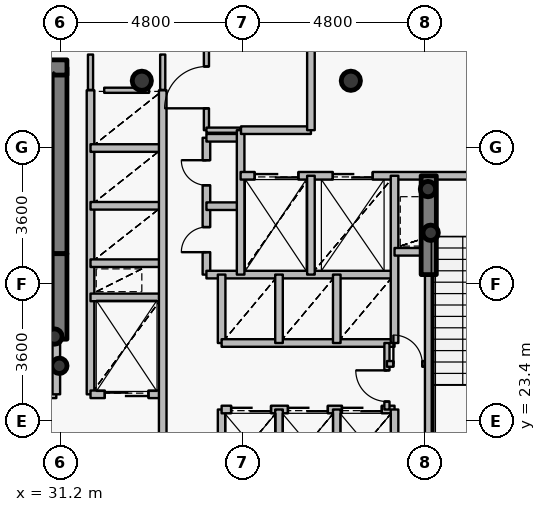
"""IFC4 building model, lengths in metres.
Left out: names, types, materials, properties, quantities, classifications, styles, units other than length and angle.
Written with IfcOpenShell. Run it as: python <this file> out.ifc"""

import sys

from ifc_helpers import new_model, si_unit, direction, frame, frame_2d, origin, origin_2d, place, context, subcontext, project, spatial, rectangle, hollow_circle, extrude, source, transform, mapped, element, fill, save


model = new_model("IFC4")
c1 = context("Model", 3, precision=1e-05, world=origin(), true_north=direction((0.0, 1.0)))
c2 = subcontext(c1, "Body", "Model", "MODEL_VIEW")
j1 = project(units=[si_unit("LENGTHUNIT", "METRE"), si_unit("PLANEANGLEUNIT", "RADIAN")], contexts=[c1])
p1 = place(None, origin())
s1 = spatial("IfcSite", under=j1, at=p1, CompositionType="ELEMENT")
p2 = place(p1, origin())
s2 = spatial("IfcBuilding", under=s1, at=p2, CompositionType="ELEMENT")
p3 = place(p2, frame((0.0, 0.0, 82.8)))
s3 = spatial("IfcBuildingStorey", under=s2, at=p3, CompositionType="ELEMENT", Elevation=82.8)
for number, where, z_axis, x_axis in (
    (1, (38.85, 32.35, 0.0), (0.0, 0.0, 1.0), (1.0, 0.0, 0.0)),
    (2, (33.35, 32.35, 0.0), (0.0, 0.0, 1.0), (1.0, 0.0, 0.0)),
):
    element("IfcColumn", number, at=place(p3, frame(where, z_axis=z_axis, x_axis=x_axis)), inside=s3, PredefinedType="COLUMN", context=c2, shape_type="SweptSolid", body=[
        extrude(hollow_circle(Radius=0.254, WallThickness=0.02, at=origin_2d()), origin(), (0.0, 0.0, 1.0), 4.2),
    ])
p4 = place(p3, frame((31.18, 27.8, 0.0), z_axis=(0.0, 0.0, 1.0), x_axis=(0.0, 1.0, 0.0)))
e3 = element("IfcWall", 3, at=p4, inside=s3, PredefinedType="SHEAR", context=c2, shape_type="SweptSolid", body=[
    extrude(rectangle(XDim=4.9, YDim=0.4, at=frame_2d((2.45, 0.0))), origin(), (0.0, 0.0, 1.0), 4.2),
])
p5 = place(p3, frame((27.28, 32.7, 0.0), z_axis=(0.0, 0.0, 1.0), x_axis=(1.0, 0.0, 0.0)))
e4 = element("IfcWall", 4, at=p5, inside=s3, PredefinedType="SHEAR", context=c2, shape_type="SweptSolid", body=[
    extrude(rectangle(XDim=4.1, YDim=0.4, at=frame_2d((2.05, 0.0))), origin(), (0.0, 0.0, 1.0), 4.2),
])
for number, where, z_axis, x_axis in (
    (5, (31.05, 25.62, 0.0), (0.0, 0.0, 1.0), (1.0, 0.0, 0.0)),
    (6, (31.18, 24.85, 0.0), (0.0, 0.0, 1.0), (1.0, 0.0, 0.0)),
    (7, (40.95, 28.35, 0.0), (0.0, 0.0, 1.0), (1.0, 0.0, 0.0)),
    (8, (40.88, 29.5, 0.0), (0.0, 0.0, 1.0), (1.0, 0.0, 0.0)),
):
    element("IfcColumn", number, at=place(p3, frame(where, z_axis=z_axis, x_axis=x_axis)), inside=s3, PredefinedType="COLUMN", context=c2, shape_type="SweptSolid", body=[
        extrude(hollow_circle(Radius=0.203, WallThickness=0.016, at=origin_2d()), origin(), (0.0, 0.0, 1.0), 4.2),
    ])
p6 = place(p3, frame((31.18, 25.55, 0.0), z_axis=(0.0, 0.0, 1.0), x_axis=(0.0, 1.0, 0.0)))
e9 = element("IfcWall", 9, at=p6, inside=s3, PredefinedType="SHEAR", context=c2, shape_type="SweptSolid", body=[
    extrude(rectangle(XDim=2.25, YDim=0.4, at=frame_2d((1.125, 0.0))), origin(), (0.0, 0.0, 1.0), 3.5),
])
p7 = place(p3, frame((40.9, 27.25, 0.0), z_axis=(0.0, 0.0, 1.0), x_axis=(0.0, 1.0, 0.0)))
e10 = element("IfcWall", 10, at=p7, inside=s3, PredefinedType="SHEAR", context=c2, shape_type="SweptSolid", body=[
    extrude(rectangle(XDim=2.6, YDim=0.4, at=frame_2d((1.3, 0.0))), origin(), (0.0, 0.0, 1.0), 3.5),
])
p8 = place(p3, frame((27.56, 24.1, 0.0), z_axis=(0.0, 0.0, 1.0), x_axis=(1.0, 0.0, 0.0)))
e11 = element("IfcWall", 11, at=p8, inside=s3, PredefinedType="PARTITIONING", context=c2, shape_type="SweptSolid", body=[
    extrude(rectangle(XDim=3.54, YDim=0.2, at=frame_2d((1.77, 0.0))), origin(), (0.0, 0.0, 1.0), 3.9),
])
p9 = place(p8, frame((1.17, 0.0, 0.0)))
e12 = element("IfcOpeningElement", 12, at=p9, cuts=e11, PredefinedType="OPENING", context=c2, shape_type="SweptSolid", body=[
    extrude(rectangle(XDim=1.2, YDim=2.15, at=origin_2d()), frame((0.6, 0.11, 1.075), z_axis=(0.0, -1.0, 0.0), x_axis=(1.0, 0.0, 0.0)), (0.0, 0.0, 1.0), 0.22),
])
p10 = place(p3, frame((31.1, 24.1, 0.0), z_axis=(0.0, 0.0, 1.0), x_axis=(0.0, 1.0, 0.0)))
e13 = element("IfcWall", 13, at=p10, inside=s3, PredefinedType="PARTITIONING", context=c2, shape_type="SweptSolid", body=[
    extrude(rectangle(XDim=1.44, YDim=0.2, at=frame_2d((0.72, 0.0))), origin(), (0.0, 0.0, 1.0), 3.9),
])
p11 = place(p3, frame((32.0, 24.1, 0.0), z_axis=(0.0, 0.0, 1.0), x_axis=(0.0, 1.0, 0.0)))
e14 = element("IfcWall", 14, at=p11, inside=s3, PredefinedType="PARTITIONING", context=c2, shape_type="SweptSolid", body=[
    extrude(rectangle(XDim=8.0, YDim=0.2, at=frame_2d((4.0, 0.0))), origin(), (0.0, 0.0, 1.0), 3.9),
])
p12 = place(p3, frame((32.0, 24.1, 0.0), z_axis=(0.0, 0.0, 1.0), x_axis=(1.0, 0.0, 0.0)))
e15 = element("IfcWall", 15, at=p12, inside=s3, PredefinedType="PARTITIONING", context=c2, shape_type="SweptSolid", body=[
    extrude(rectangle(XDim=1.9, YDim=0.2, at=frame_2d((0.95, 0.0))), origin(), (0.0, 0.0, 1.0), 3.485),
])
p13 = place(p12, frame((0.375, 0.0, 0.0)))
e16 = element("IfcOpeningElement", 16, at=p13, cuts=e15, PredefinedType="OPENING", context=c2, shape_type="SweptSolid", body=[
    extrude(rectangle(XDim=1.15, YDim=2.15, at=origin_2d()), frame((0.575, 0.11, 1.075), z_axis=(0.0, -1.0, 0.0), x_axis=(1.0, 0.0, 0.0)), (0.0, 0.0, 1.0), 0.22),
])
for number, where, z_axis, x_axis in (
    (17, (32.0, 26.65, 0.0), (0.0, 0.0, 1.0), (1.0, 0.0, 0.0)),
    (18, (32.0, 27.55, 0.0), (0.0, 0.0, 1.0), (1.0, 0.0, 0.0)),
    (19, (32.0, 29.06, 0.0), (0.0, 0.0, 1.0), (1.0, 0.0, 0.0)),
    (20, (32.0, 30.58, 0.0), (0.0, 0.0, 1.0), (1.0, 0.0, 0.0)),
):
    element("IfcWall", number, at=place(p3, frame(where, z_axis=z_axis, x_axis=x_axis)), inside=s3, PredefinedType="PARTITIONING", context=c2, shape_type="SweptSolid", body=[
        extrude(rectangle(XDim=1.9, YDim=0.2, at=frame_2d((0.95, 0.0))), origin(), (0.0, 0.0, 1.0), 3.485),
    ])
p14 = place(p3, frame((33.9, 20.7, 0.0), z_axis=(0.0, 0.0, 1.0), x_axis=(0.0, 1.0, 0.0)))
e21 = element("IfcWall", 21, at=p14, inside=s3, PredefinedType="PARTITIONING", context=c2, shape_type="SweptSolid", body=[
    extrude(rectangle(XDim=11.4, YDim=0.2, at=frame_2d((5.7, 0.0))), origin(), (0.0, 0.0, 1.0), 3.485),
])
p15 = place(p3, frame((35.05, 27.25, 0.0), z_axis=(0.0, 0.0, 1.0), x_axis=(0.0, 1.0, 0.0)))
e22 = element("IfcWall", 22, at=p15, inside=s3, PredefinedType="PARTITIONING", context=c2, shape_type="SweptSolid", body=[
    extrude(rectangle(XDim=3.6, YDim=0.2, at=frame_2d((1.8, 0.0))), origin(), (0.0, 0.0, 1.0), 3.9),
])
p16 = place(p15, frame((0.59, 0.0, 0.0)))
e23 = element("IfcOpeningElement", 23, at=p16, cuts=e22, PredefinedType="OPENING", context=c2, shape_type="SweptSolid", body=[
    extrude(rectangle(XDim=0.66, YDim=2.05, at=origin_2d()), frame((0.33, 0.11, 1.025), z_axis=(0.0, -1.0, 0.0), x_axis=(1.0, 0.0, 0.0)), (0.0, 0.0, 1.0), 0.22),
])
p17 = place(p15, frame((2.35, 0.0, 0.0)))
e24 = element("IfcOpeningElement", 24, at=p17, cuts=e22, PredefinedType="OPENING", context=c2, shape_type="SweptSolid", body=[
    extrude(rectangle(XDim=0.66, YDim=2.05, at=origin_2d()), frame((0.33, 0.11, 1.025), z_axis=(0.0, -1.0, 0.0), x_axis=(1.0, 0.0, 0.0)), (0.0, 0.0, 1.0), 0.22),
])
p18 = place(p3, frame((35.05, 27.25, 0.0), z_axis=(0.0, 0.0, 1.0), x_axis=(1.0, 0.0, 0.0)))
e25 = element("IfcWall", 25, at=p18, inside=s3, PredefinedType="PARTITIONING", context=c2, shape_type="SweptSolid", body=[
    extrude(rectangle(XDim=4.95, YDim=0.2, at=frame_2d((2.475, 0.0))), origin(), (0.0, 0.0, 1.0), 3.485),
])
for number, where, z_axis, x_axis in (
    (26, (35.05, 29.05, 0.0), (0.0, 0.0, 1.0), (1.0, 0.0, 0.0)),
    (27, (35.05, 30.85, 0.0), (0.0, 0.0, 1.0), (1.0, 0.0, 0.0)),
):
    element("IfcWall", number, at=place(p3, frame(where, z_axis=z_axis, x_axis=x_axis)), inside=s3, PredefinedType="PARTITIONING", context=c2, shape_type="SweptSolid", body=[
        extrude(rectangle(XDim=0.9, YDim=0.2, at=frame_2d((0.45, 0.0))), origin(), (0.0, 0.0, 1.0), 3.9),
    ])
p19 = place(p3, frame((35.05, 31.05, 0.0), z_axis=(0.0, 0.0, 1.0), x_axis=(0.0, 1.0, 0.0)))
e28 = element("IfcWall", 28, at=p19, inside=s3, PredefinedType="PARTITIONING", context=c2, shape_type="SweptSolid", body=[
    extrude(rectangle(XDim=2.25, YDim=0.135, at=frame_2d((1.125, 0.0))), origin(), (0.0, 0.0, 1.0), 3.485),
])
p20 = place(p19, frame((0.575, 0.0, 0.0)))
e29 = element("IfcOpeningElement", 29, at=p20, cuts=e28, PredefinedType="OPENING", context=c2, shape_type="SweptSolid", body=[
    extrude(rectangle(XDim=1.1, YDim=2.15, at=origin_2d()), frame((0.55, 0.078, 1.075), z_axis=(0.0, -1.0, 0.0), x_axis=(1.0, 0.0, 0.0)), (0.0, 0.0, 1.0), 0.155),
])
p21 = place(p3, frame((35.05, 31.05, 0.0), z_axis=(0.0, 0.0, 1.0), x_axis=(1.0, 0.0, 0.0)))
e30 = element("IfcWall", 30, at=p21, inside=s3, PredefinedType="PARTITIONING", context=c2, shape_type="SweptSolid", body=[
    extrude(rectangle(XDim=0.9, YDim=0.135, at=frame_2d((0.45, 0.0))), origin(), (0.0, 0.0, 1.0), 3.9),
])
p22 = place(p3, frame((35.45, 21.9, 0.0), z_axis=(0.0, 0.0, 1.0), x_axis=(0.0, 1.0, 0.0)))
e31 = element("IfcWall", 31, at=p22, inside=s3, PredefinedType="PARTITIONING", context=c2, shape_type="SweptSolid", body=[
    extrude(rectangle(XDim=1.8, YDim=0.2, at=frame_2d((0.9, 0.0))), origin(), (0.0, 0.0, 1.0), 3.9),
])
p23 = place(p3, frame((35.45, 23.7, 0.0), z_axis=(0.0, 0.0, 1.0), x_axis=(1.0, 0.0, 0.0)))
e32 = element("IfcWall", 32, at=p23, inside=s3, PredefinedType="PARTITIONING", context=c2, shape_type="SweptSolid", body=[
    extrude(rectangle(XDim=4.55, YDim=0.2, at=frame_2d((2.275, 0.0))), origin(), (0.0, 0.0, 1.0), 3.485),
])
p24 = place(p23, frame((0.25, 0.0, 0.0)))
e33 = element("IfcOpeningElement", 33, at=p24, cuts=e32, PredefinedType="OPENING", context=c2, shape_type="SweptSolid", body=[
    extrude(rectangle(XDim=1.05, YDim=2.15, at=origin_2d()), frame((0.525, 0.11, 1.075), z_axis=(0.0, -1.0, 0.0), x_axis=(1.0, 0.0, 0.0)), (0.0, 0.0, 1.0), 0.22),
])
p25 = place(p23, frame((1.745, 0.0, 0.0)))
e34 = element("IfcOpeningElement", 34, at=p25, cuts=e32, PredefinedType="OPENING", context=c2, shape_type="SweptSolid", body=[
    extrude(rectangle(XDim=1.05, YDim=2.15, at=origin_2d()), frame((0.525, 0.11, 1.075), z_axis=(0.0, -1.0, 0.0), x_axis=(1.0, 0.0, 0.0)), (0.0, 0.0, 1.0), 0.22),
])
p26 = place(p23, frame((3.165, 0.0, 0.0)))
e35 = element("IfcOpeningElement", 35, at=p26, cuts=e32, PredefinedType="OPENING", context=c2, shape_type="SweptSolid", body=[
    extrude(rectangle(XDim=1.05, YDim=2.15, at=origin_2d()), frame((0.525, 0.11, 1.075), z_axis=(0.0, -1.0, 0.0), x_axis=(1.0, 0.0, 0.0)), (0.0, 0.0, 1.0), 0.22),
])
p27 = place(p3, frame((35.45, 25.45, 0.0), z_axis=(0.0, 0.0, 1.0), x_axis=(0.0, 1.0, 0.0)))
e36 = element("IfcWall", 36, at=p27, inside=s3, PredefinedType="PARTITIONING", context=c2, shape_type="SweptSolid", body=[
    extrude(rectangle(XDim=1.8, YDim=0.2, at=frame_2d((0.9, 0.0))), origin(), (0.0, 0.0, 1.0), 3.9),
])
p28 = place(p3, frame((35.45, 25.45, 0.0), z_axis=(0.0, 0.0, 1.0), x_axis=(1.0, 0.0, 0.0)))
e37 = element("IfcWall", 37, at=p28, inside=s3, PredefinedType="PARTITIONING", context=c2, shape_type="SweptSolid", body=[
    extrude(rectangle(XDim=4.55, YDim=0.2, at=frame_2d((2.275, 0.0))), origin(), (0.0, 0.0, 1.0), 3.485),
])
p29 = place(p3, frame((35.95, 27.25, 0.0), z_axis=(0.0, 0.0, 1.0), x_axis=(0.0, 1.0, 0.0)))
e38 = element("IfcWall", 38, at=p29, inside=s3, PredefinedType="PARTITIONING", context=c2, shape_type="SweptSolid", body=[
    extrude(rectangle(XDim=3.8, YDim=0.2, at=frame_2d((1.9, 0.0))), origin(), (0.0, 0.0, 1.0), 3.9),
])
p30 = place(p3, frame((35.95, 29.85, 0.0), z_axis=(0.0, 0.0, 1.0), x_axis=(1.0, 0.0, 0.0)))
e39 = element("IfcWall", 39, at=p30, inside=s3, PredefinedType="PARTITIONING", context=c2, shape_type="SweptSolid", body=[
    extrude(rectangle(XDim=8.49, YDim=0.2, at=frame_2d((4.245, 0.0))), origin(), (0.0, 0.0, 1.0), 3.485),
])
p31 = place(p30, frame((6.1, 0.0, 0.0)))
e40 = element("IfcOpeningElement", 40, at=p31, cuts=e39, PredefinedType="OPENING", context=c2, shape_type="SweptSolid", body=[
    extrude(rectangle(XDim=1.2, YDim=2.15, at=origin_2d()), frame((0.6, 0.11, 1.075), z_axis=(0.0, -1.0, 0.0), x_axis=(1.0, 0.0, 0.0)), (0.0, 0.0, 1.0), 0.22),
])
p32 = place(p30, frame((0.37, 0.0, 0.0)))
e41 = element("IfcOpeningElement", 41, at=p32, cuts=e39, PredefinedType="OPENING", context=c2, shape_type="SweptSolid", body=[
    extrude(rectangle(XDim=1.15, YDim=2.15, at=origin_2d()), frame((0.575, 0.11, 1.075), z_axis=(0.0, -1.0, 0.0), x_axis=(1.0, 0.0, 0.0)), (0.0, 0.0, 1.0), 0.22),
])
p33 = place(p30, frame((2.425, 0.0, 0.0)))
e42 = element("IfcOpeningElement", 42, at=p33, cuts=e39, PredefinedType="OPENING", context=c2, shape_type="SweptSolid", body=[
    extrude(rectangle(XDim=1.05, YDim=2.15, at=origin_2d()), frame((0.525, 0.11, 1.075), z_axis=(0.0, -1.0, 0.0), x_axis=(1.0, 0.0, 0.0)), (0.0, 0.0, 1.0), 0.22),
])
p34 = place(p3, frame((35.96, 31.05, 0.0), z_axis=(0.0, 0.0, 1.0), x_axis=(1.0, 0.0, 0.0)))
e43 = element("IfcWall", 43, at=p34, inside=s3, PredefinedType="PARTITIONING", context=c2, shape_type="SweptSolid", body=[
    extrude(rectangle(XDim=1.84, YDim=0.2, at=frame_2d((0.92, 0.0))), origin(), (0.0, 0.0, 1.0), 3.9),
])
for number, where, z_axis, x_axis in (
    (44, (36.96, 21.9, 0.0), (0.0, 0.0, 1.0), (0.0, 1.0, 0.0)),
    (45, (36.96, 25.45, 0.0), (0.0, 0.0, 1.0), (0.0, 1.0, 0.0)),
):
    element("IfcWall", number, at=place(p3, frame(where, z_axis=z_axis, x_axis=x_axis)), inside=s3, PredefinedType="PARTITIONING", context=c2, shape_type="SweptSolid", body=[
        extrude(rectangle(XDim=1.8, YDim=0.2, at=frame_2d((0.9, 0.0))), origin(), (0.0, 0.0, 1.0), 3.9),
    ])
p35 = place(p3, frame((37.8, 27.25, 0.0), z_axis=(0.0, 0.0, 1.0), x_axis=(0.0, 1.0, 0.0)))
e46 = element("IfcWall", 46, at=p35, inside=s3, PredefinedType="PARTITIONING", context=c2, shape_type="SweptSolid", body=[
    extrude(rectangle(XDim=2.6, YDim=0.2, at=frame_2d((1.3, 0.0))), origin(), (0.0, 0.0, 1.0), 3.9),
])
p36 = place(p3, frame((37.8, 31.05, 0.0), z_axis=(0.0, 0.0, 1.0), x_axis=(0.0, 1.0, 0.0)))
e47 = element("IfcWall", 47, at=p36, inside=s3, PredefinedType="PARTITIONING", context=c2, shape_type="SweptSolid", body=[
    extrude(rectangle(XDim=2.25, YDim=0.2, at=frame_2d((1.125, 0.0))), origin(), (0.0, 0.0, 1.0), 3.485),
])
for number, where, z_axis, x_axis in (
    (48, (38.48, 21.9, 0.0), (0.0, 0.0, 1.0), (0.0, 1.0, 0.0)),
    (49, (38.48, 25.45, 0.0), (0.0, 0.0, 1.0), (0.0, 1.0, 0.0)),
):
    element("IfcWall", number, at=place(p3, frame(where, z_axis=z_axis, x_axis=x_axis)), inside=s3, PredefinedType="PARTITIONING", context=c2, shape_type="SweptSolid", body=[
        extrude(rectangle(XDim=1.8, YDim=0.2, at=frame_2d((0.9, 0.0))), origin(), (0.0, 0.0, 1.0), 3.9),
    ])
p37 = place(p3, frame((39.8, 23.7, 0.0), z_axis=(0.0, 0.0, 1.0), x_axis=(0.0, 1.0, 0.0)))
e50 = element("IfcWall", 50, at=p37, inside=s3, PredefinedType="PARTITIONING", context=c2, shape_type="SweptSolid", body=[
    extrude(rectangle(XDim=1.75, YDim=0.135, at=frame_2d((0.875, 0.0))), origin(), (0.0, 0.0, 1.0), 3.9),
])
p38 = place(p37, frame((0.21, 0.0, 0.0)))
e51 = element("IfcOpeningElement", 51, at=p38, cuts=e50, PredefinedType="OPENING", context=c2, shape_type="SweptSolid", body=[
    extrude(rectangle(XDim=0.82, YDim=2.1, at=origin_2d()), frame((0.41, 0.078, 1.05), z_axis=(0.0, -1.0, 0.0), x_axis=(1.0, 0.0, 0.0)), (0.0, 0.0, 1.0), 0.155),
])
p39 = place(p3, frame((39.8, 24.9, 0.0), z_axis=(0.0, 0.0, 1.0), x_axis=(1.0, 0.0, 0.0)))
e52 = element("IfcWall", 52, at=p39, inside=s3, PredefinedType="PARTITIONING", context=c2, shape_type="SweptSolid", body=[
    extrude(rectangle(XDim=1.1, YDim=0.15, at=frame_2d((0.55, 0.0))), origin(), (0.0, 0.0, 1.0), 3.9),
])
p40 = place(p39, frame((0.17, 0.0, 0.0)))
e53 = element("IfcOpeningElement", 53, at=p40, cuts=e52, PredefinedType="OPENING", context=c2, shape_type="SweptSolid", body=[
    extrude(rectangle(XDim=0.76, YDim=2.1, at=origin_2d()), frame((0.38, 0.085, 1.05), z_axis=(0.0, -1.0, 0.0), x_axis=(1.0, 0.0, 0.0)), (0.0, 0.0, 1.0), 0.17),
])
p41 = place(p3, frame((40.0, 21.9, 0.0), z_axis=(0.0, 0.0, 1.0), x_axis=(0.0, 1.0, 0.0)))
e54 = element("IfcWall", 54, at=p41, inside=s3, PredefinedType="PARTITIONING", context=c2, shape_type="SweptSolid", body=[
    extrude(rectangle(XDim=1.8, YDim=0.2, at=frame_2d((0.9, 0.0))), origin(), (0.0, 0.0, 1.0), 3.9),
])
p42 = place(p3, frame((40.0, 25.45, 0.0), z_axis=(0.0, 0.0, 1.0), x_axis=(0.0, 1.0, 0.0)))
e55 = element("IfcWall", 55, at=p42, inside=s3, PredefinedType="PARTITIONING", context=c2, shape_type="SweptSolid", body=[
    extrude(rectangle(XDim=4.4, YDim=0.2, at=frame_2d((2.2, 0.0))), origin(), (0.0, 0.0, 1.0), 3.9),
])
p43 = place(p3, frame((40.0, 27.85, 0.0), z_axis=(0.0, 0.0, 1.0), x_axis=(1.0, 0.0, 0.0)))
e56 = element("IfcWall", 56, at=p43, inside=s3, PredefinedType="PARTITIONING", context=c2, shape_type="SweptSolid", body=[
    extrude(rectangle(XDim=0.9, YDim=0.2, at=frame_2d((0.45, 0.0))), origin(), (0.0, 0.0, 1.0), 3.9),
])
p44 = place(p3, frame((40.9, 21.33, 0.0), z_axis=(0.0, 0.0, 1.0), x_axis=(0.0, 1.0, 0.0)))
e57 = element("IfcWall", 57, at=p44, inside=s3, PredefinedType="PARTITIONING", context=c2, shape_type="SweptSolid", body=[
    extrude(rectangle(XDim=5.91, YDim=0.2, at=frame_2d((2.955, 0.0))), origin(), (0.0, 0.0, 1.0), 3.435),
])
p45 = place(p3, frame((32.36, 32.1, 0.0), z_axis=(0.0, 0.0, 1.0), x_axis=(1.0, 0.0, 0.0)))
e58 = element("IfcWall", 58, at=p45, inside=s3, PredefinedType="PARTITIONING", context=c2, shape_type="SweptSolid", body=[
    extrude(rectangle(XDim=1.18, YDim=0.135, at=frame_2d((0.59, 0.0))), origin(), (0.0, 0.0, 1.0), 3.485),
])
p46 = place(p3, frame((32.0, 33.04, 0.0), z_axis=(0.0, 0.0, 1.0), x_axis=(0.0, -1.0, 0.0)))
e59 = element("IfcWall", 59, at=p46, inside=s3, PredefinedType="PARTITIONING", context=c2, shape_type="SweptSolid", body=[
    extrude(rectangle(XDim=0.93, YDim=0.135, at=frame_2d((0.465, 0.0))), origin(), (0.0, 0.0, 1.0), 3.435),
])
p47 = place(p3, frame((33.9, 32.11, 0.0), z_axis=(0.0, 0.0, 1.0), x_axis=(0.0, 1.0, 0.0)))
e60 = element("IfcWall", 60, at=p47, inside=s3, PredefinedType="PARTITIONING", context=c2, shape_type="SweptSolid", body=[
    extrude(rectangle(XDim=0.93, YDim=0.135, at=frame_2d((0.465, 0.0))), origin(), (0.0, 0.0, 1.0), 3.485),
])
m1 = source(origin(), c2, "Body", "SweptSolid", [
    extrude(rectangle(XDim=1.15, YDim=2.15, at=origin_2d()), frame((0.575, 0.025, 1.075), z_axis=(0.0, -1.0, 0.0), x_axis=(1.0, 0.0, 0.0)), (0.0, 0.0, 1.0), 0.05),
])
p48 = place(p32, origin())
e61 = element("IfcDoor", 61, at=p48, inside=s3, OperationType="DOUBLE_DOOR_SLIDING", PredefinedType="USERDEFINED", context=c2, shape_type="MappedRepresentation", body=[
    mapped(m1, transform((0.0, 0.0, 0.0), x_axis=(1.0, 0.0, 0.0), y_axis=(0.0, 1.0, 0.0), z_axis=(0.0, 0.0, 1.0), scale=1.0)),
])
fill(e41, e61)
p49 = place(p13, origin())
e62 = element("IfcDoor", 62, at=p49, inside=s3, OperationType="DOUBLE_DOOR_SLIDING", PredefinedType="USERDEFINED", context=c2, shape_type="MappedRepresentation", body=[
    mapped(m1, transform((0.0, 0.0, 0.0), x_axis=(1.0, 0.0, 0.0), y_axis=(0.0, 1.0, 0.0), z_axis=(0.0, 0.0, 1.0), scale=1.0)),
])
fill(e16, e62)
m2 = source(origin(), c2, "Body", "SweptSolid", [
    extrude(rectangle(XDim=1.05, YDim=2.15, at=origin_2d()), frame((0.525, 0.025, 1.075), z_axis=(0.0, -1.0, 0.0), x_axis=(1.0, 0.0, 0.0)), (0.0, 0.0, 1.0), 0.05),
])
p50 = place(p33, origin())
e63 = element("IfcDoor", 63, at=p50, inside=s3, OperationType="DOUBLE_DOOR_SLIDING", PredefinedType="USERDEFINED", context=c2, shape_type="MappedRepresentation", body=[
    mapped(m2, transform((0.0, 0.0, 0.0), x_axis=(1.0, 0.0, 0.0), y_axis=(0.0, 1.0, 0.0), z_axis=(0.0, 0.0, 1.0), scale=1.0)),
])
fill(e42, e63)
p51 = place(p24, origin())
e64 = element("IfcDoor", 64, at=p51, inside=s3, OperationType="DOUBLE_DOOR_SLIDING", PredefinedType="USERDEFINED", context=c2, shape_type="MappedRepresentation", body=[
    mapped(m2, transform((0.0, 0.0, 0.0), x_axis=(1.0, 0.0, 0.0), y_axis=(0.0, 1.0, 0.0), z_axis=(0.0, 0.0, 1.0), scale=1.0)),
])
fill(e33, e64)
p52 = place(p25, origin())
e65 = element("IfcDoor", 65, at=p52, inside=s3, OperationType="DOUBLE_DOOR_SLIDING", PredefinedType="USERDEFINED", context=c2, shape_type="MappedRepresentation", body=[
    mapped(m2, transform((0.0, 0.0, 0.0), x_axis=(1.0, 0.0, 0.0), y_axis=(0.0, 1.0, 0.0), z_axis=(0.0, 0.0, 1.0), scale=1.0)),
])
fill(e34, e65)
p53 = place(p26, origin())
e66 = element("IfcDoor", 66, at=p53, inside=s3, OperationType="DOUBLE_DOOR_SLIDING", PredefinedType="USERDEFINED", context=c2, shape_type="MappedRepresentation", body=[
    mapped(m2, transform((0.0, 0.0, 0.0), x_axis=(1.0, 0.0, 0.0), y_axis=(0.0, 1.0, 0.0), z_axis=(0.0, 0.0, 1.0), scale=1.0)),
])
fill(e35, e66)
m3 = source(origin(), c2, "Body", "SweptSolid", [
    extrude(rectangle(XDim=0.66, YDim=2.05, at=origin_2d()), frame((0.33, 0.025, 1.025), z_axis=(0.0, -1.0, 0.0), x_axis=(1.0, 0.0, 0.0)), (0.0, 0.0, 1.0), 0.05),
])
p54 = place(p16, origin())
e67 = element("IfcDoor", 67, at=p54, inside=s3, OperationType="SINGLE_SWING_LEFT", PredefinedType="USERDEFINED", context=c2, shape_type="MappedRepresentation", body=[
    mapped(m3, transform((0.0, 0.0, 0.0), x_axis=(1.0, 0.0, 0.0), y_axis=(0.0, 1.0, 0.0), z_axis=(0.0, 0.0, 1.0), scale=1.0)),
])
fill(e23, e67)
p55 = place(p17, origin())
e68 = element("IfcDoor", 68, at=p55, inside=s3, OperationType="SINGLE_SWING_RIGHT", PredefinedType="USERDEFINED", context=c2, shape_type="MappedRepresentation", body=[
    mapped(m3, transform((0.0, 0.0, 0.0), x_axis=(1.0, 0.0, 0.0), y_axis=(0.0, 1.0, 0.0), z_axis=(0.0, 0.0, 1.0), scale=1.0)),
])
fill(e24, e68)
m4 = source(origin(), c2, "Body", "SweptSolid", [
    extrude(rectangle(XDim=1.1, YDim=2.15, at=origin_2d()), frame((0.55, 0.025, 1.075), z_axis=(0.0, -1.0, 0.0), x_axis=(1.0, 0.0, 0.0)), (0.0, 0.0, 1.0), 0.05),
])
p56 = place(p20, origin())
e69 = element("IfcDoor", 69, at=p56, inside=s3, OperationType="SINGLE_SWING_LEFT", PredefinedType="DOOR", context=c2, shape_type="MappedRepresentation", body=[
    mapped(m4, transform((0.0, 0.0, 0.0), x_axis=(1.0, 0.0, 0.0), y_axis=(0.0, 1.0, 0.0), z_axis=(0.0, 0.0, 1.0), scale=1.0)),
])
fill(e29, e69)
m5 = source(origin(), c2, "Body", "SweptSolid", [
    extrude(rectangle(XDim=0.82, YDim=2.1, at=origin_2d()), frame((0.41, 0.025, 1.05), z_axis=(0.0, -1.0, 0.0), x_axis=(1.0, 0.0, 0.0)), (0.0, 0.0, 1.0), 0.05),
])
p57 = place(p38, origin())
e70 = element("IfcDoor", 70, at=p57, inside=s3, OperationType="SINGLE_SWING_RIGHT", PredefinedType="DOOR", context=c2, shape_type="MappedRepresentation", body=[
    mapped(m5, transform((0.0, 0.0, 0.0), x_axis=(1.0, 0.0, 0.0), y_axis=(0.0, 1.0, 0.0), z_axis=(0.0, 0.0, 1.0), scale=1.0)),
])
fill(e51, e70)
m6 = source(origin(), c2, "Body", "SweptSolid", [
    extrude(rectangle(XDim=0.76, YDim=2.1, at=origin_2d()), frame((0.38, 0.025, 1.05), z_axis=(0.0, -1.0, 0.0), x_axis=(1.0, 0.0, 0.0)), (0.0, 0.0, 1.0), 0.05),
])
p58 = place(p40, origin())
e71 = element("IfcDoor", 71, at=p58, inside=s3, OperationType="SINGLE_SWING_LEFT", PredefinedType="DOOR", context=c2, shape_type="MappedRepresentation", body=[
    mapped(m6, transform((0.0, 0.0, 0.0), x_axis=(1.0, 0.0, 0.0), y_axis=(0.0, 1.0, 0.0), z_axis=(0.0, 0.0, 1.0), scale=1.0)),
])
fill(e53, e71)
save(model, sys.argv[1])
